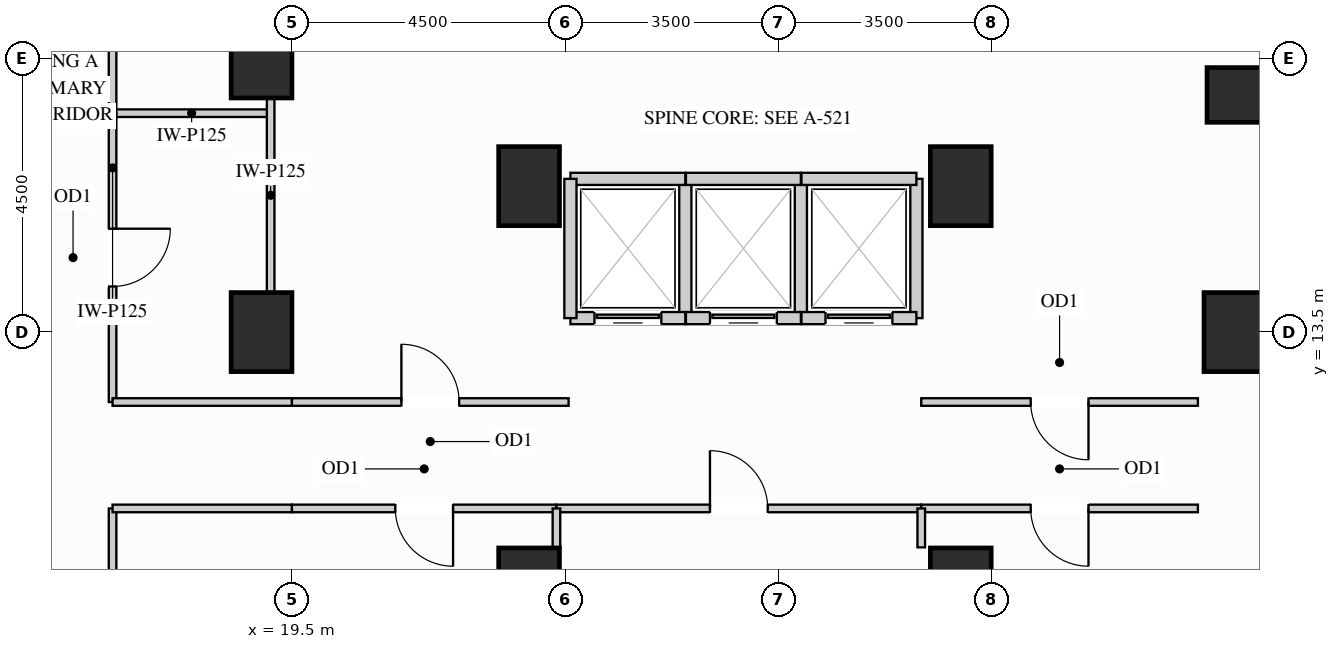
"""IFC4 building model, lengths in metres.
Left out: names, types, materials, properties, quantities, classifications, styles, units other than length and angle.
Written with IfcOpenShell. Run it as: python <this file> out.ifc"""

import sys

from ifc_helpers import new_model, si_unit, direction, frame, frame_2d, origin, origin_2d, place, context, subcontext, project, spatial, rectangle, extrude, source, transform, mapped, element, fill, save


model = new_model("IFC4")
c1 = context("Model", 3, precision=1e-05, world=origin(), true_north=direction((0.0, 1.0)))
c2 = subcontext(c1, "Body", "Model", "MODEL_VIEW")
j1 = project(units=[si_unit("LENGTHUNIT", "METRE"), si_unit("PLANEANGLEUNIT", "RADIAN")], contexts=[c1])
p1 = place(None, origin())
s1 = spatial("IfcSite", under=j1, at=p1, CompositionType="ELEMENT")
p2 = place(p1, origin())
s2 = spatial("IfcBuilding", under=s1, at=p2, CompositionType="ELEMENT")
p3 = place(p2, frame((0.0, 0.0, 58.5)))
s3 = spatial("IfcBuildingStorey", under=s2, at=p3, CompositionType="ELEMENT", Elevation=58.5)
m1 = source(origin(), c2, "Body", "SweptSolid", [
    extrude(rectangle(XDim=0.9, YDim=0.9, at=origin_2d()), origin(), (0.0, 0.0, 1.0), 3.38),
])
p4 = place(p3, frame((35.0, 17.4, 0.0), z_axis=(0.0, 0.0, 1.0), x_axis=(1.0, 0.0, 0.0)))
e1 = element("IfcColumn", 1, at=p4, inside=s3, PredefinedType="COLUMN", context=c2, shape_type="MappedRepresentation", body=[
    mapped(m1, transform((0.0, 0.0, 0.0), x_axis=(1.0, 0.0, 0.0), y_axis=(0.0, 1.0, 0.0), z_axis=(0.0, 0.0, 1.0))),
])
m2 = source(origin(), c2, "Body", "SweptSolid", [
    extrude(rectangle(XDim=1.0, YDim=1.3, at=origin_2d()), origin(), (0.0, 0.0, 1.0), 3.38),
])
for number, where, z_axis, x_axis in (
    (2, (19.0, 13.5, 0.0), (0.0, 0.0, 1.0), (1.0, 0.0, 0.0)),
    (3, (19.0, 18.0, 0.0), (0.0, 0.0, 1.0), (1.0, 0.0, 0.0)),
    (4, (35.0, 13.5, 0.0), (0.0, 0.0, 1.0), (1.0, 0.0, 0.0)),
    (5, (23.4, 15.9, 0.0), (0.0, 0.0, 1.0), (1.0, 0.0, 0.0)),
    (6, (23.4, 9.3, 0.0), (0.0, 0.0, 1.0), (1.0, 0.0, 0.0)),
    (7, (30.5, 15.9, 0.0), (0.0, 0.0, 1.0), (1.0, 0.0, 0.0)),
    (8, (30.5, 9.3, 0.0), (0.0, 0.0, 1.0), (1.0, 0.0, 0.0)),
):
    element("IfcColumn", number, at=place(p3, frame(where, z_axis=z_axis, x_axis=x_axis)), inside=s3, PredefinedType="COLUMN", context=c2, shape_type="MappedRepresentation", body=[
        mapped(m2, transform((0.0, 0.0, 0.0), x_axis=(1.0, 0.0, 0.0), y_axis=(0.0, 1.0, 0.0), z_axis=(0.0, 0.0, 1.0))),
    ])
m3 = source(origin(), c2, "Body", "SweptSolid", [
    extrude(rectangle(XDim=2.6, YDim=0.125, at=frame_2d((1.3, 0.0))), origin(), (0.0, 0.0, 1.0), 3.365),
])
p5 = place(p3, frame((16.55, 17.1, 0.0), z_axis=(0.0, 0.0, 1.0), x_axis=(1.0, 0.0, 0.0)))
e9 = element("IfcWall", 9, at=p5, inside=s3, PredefinedType="PARTITIONING", context=c2, shape_type="MappedRepresentation", body=[
    mapped(m3, transform((0.0, 0.0, 0.0), x_axis=(1.0, 0.0, 0.0), y_axis=(0.0, 1.0, 0.0), z_axis=(0.0, 0.0, 1.0))),
])
m4 = source(origin(), c2, "Body", "SweptSolid", [
    extrude(rectangle(XDim=3.18, YDim=0.125, at=frame_2d((1.59, 0.0))), origin(), (0.0, 0.0, 1.0), 2.67),
])
p6 = place(p3, frame((19.15, 14.16, 0.0), z_axis=(0.0, 0.0, 1.0), x_axis=(0.0, 1.0, 0.0)))
e10 = element("IfcWall", 10, at=p6, inside=s3, PredefinedType="PARTITIONING", context=c2, shape_type="MappedRepresentation", body=[
    mapped(m4, transform((0.0, 0.0, 0.0), x_axis=(1.0, 0.0, 0.0), y_axis=(0.0, 1.0, 0.0), z_axis=(0.0, 0.0, 1.0))),
])
p7 = place(p3, frame((16.55, 12.35, 0.0), z_axis=(0.0, 0.0, 1.0), x_axis=(0.0, 1.0, 0.0)))
e11 = element("IfcWall", 11, at=p7, inside=s3, PredefinedType="PARTITIONING", context=c2, shape_type="SweptSolid", body=[
    extrude(rectangle(XDim=4.75, YDim=0.125, at=frame_2d((2.375, 0.0))), origin(), (0.0, 0.0, 1.0), 3.365),
])
p8 = place(p7, frame((1.9, 0.0, 0.0)))
e12 = element("IfcOpeningElement", 12, at=p8, cuts=e11, PredefinedType="OPENING", context=c2, shape_type="SweptSolid", body=[
    extrude(rectangle(XDim=0.95, YDim=2.15, at=frame_2d((0.475, 1.075))), frame((0.0, 0.073, 0.0), z_axis=(0.0, -1.0, 0.0), x_axis=(1.0, 0.0, 0.0)), (0.0, 0.0, 1.0), 0.145),
])
p9 = place(p3, frame((16.55, 17.1, 0.0), z_axis=(0.0, 0.0, 1.0), x_axis=(0.0, 1.0, 0.0)))
e13 = element("IfcWall", 13, at=p9, inside=s3, PredefinedType="PARTITIONING", context=c2, shape_type="SweptSolid", body=[
    extrude(rectangle(XDim=6.25, YDim=0.125, at=frame_2d((3.125, 0.0))), origin(), (0.0, 0.0, 1.0), 3.365),
])
p10 = place(p9, frame((2.65, 0.0, 0.0)))
e14 = element("IfcOpeningElement", 14, at=p10, cuts=e13, PredefinedType="OPENING", context=c2, shape_type="SweptSolid", body=[
    extrude(rectangle(XDim=0.95, YDim=2.15, at=frame_2d((0.475, 1.075))), frame((0.0, 0.073, 0.0), z_axis=(0.0, -1.0, 0.0), x_axis=(1.0, 0.0, 0.0)), (0.0, 0.0, 1.0), 0.145),
])
p11 = place(p3, frame((16.55, 5.65, 0.0), z_axis=(0.0, 0.0, 1.0), x_axis=(0.0, 1.0, 0.0)))
e15 = element("IfcWall", 15, at=p11, inside=s3, PredefinedType="PARTITIONING", context=c2, shape_type="SweptSolid", body=[
    extrude(rectangle(XDim=4.95, YDim=0.125, at=frame_2d((2.475, 0.0))), origin(), (0.0, 0.0, 1.0), 3.365),
])
p12 = place(p11, frame((2.0, 0.0, 0.0)))
e16 = element("IfcOpeningElement", 16, at=p12, cuts=e15, PredefinedType="OPENING", context=c2, shape_type="SweptSolid", body=[
    extrude(rectangle(XDim=0.95, YDim=2.15, at=frame_2d((0.475, 1.075))), frame((0.0, 0.073, 0.0), z_axis=(0.0, -1.0, 0.0), x_axis=(1.0, 0.0, 0.0)), (0.0, 0.0, 1.0), 0.145),
])
p13 = place(p3, frame((29.85, 12.35, 0.0), z_axis=(0.0, 0.0, 1.0), x_axis=(1.0, 0.0, 0.0)))
e17 = element("IfcWall", 17, at=p13, inside=s3, PredefinedType="PARTITIONING", context=c2, shape_type="SweptSolid", body=[
    extrude(rectangle(XDim=4.55, YDim=0.125, at=frame_2d((2.275, 0.0))), origin(), (0.0, 0.0, 1.0), 3.365),
])
p14 = place(p13, frame((1.8, 0.0, 0.0)))
e18 = element("IfcOpeningElement", 18, at=p14, cuts=e17, PredefinedType="OPENING", context=c2, shape_type="SweptSolid", body=[
    extrude(rectangle(XDim=0.95, YDim=2.15, at=frame_2d((0.475, 1.075))), frame((0.0, 0.073, 0.0), z_axis=(0.0, -1.0, 0.0), x_axis=(1.0, 0.0, 0.0)), (0.0, 0.0, 1.0), 0.145),
])
m5 = source(origin(), c2, "Body", "SweptSolid", [
    extrude(rectangle(XDim=2.95, YDim=0.125, at=frame_2d((1.475, 0.0))), origin(), (0.0, 0.0, 1.0), 3.365),
])
p15 = place(p3, frame((16.55, 12.35, 0.0), z_axis=(0.0, 0.0, 1.0), x_axis=(1.0, 0.0, 0.0)))
e19 = element("IfcWall", 19, at=p15, inside=s3, PredefinedType="PARTITIONING", context=c2, shape_type="MappedRepresentation", body=[
    mapped(m5, transform((0.0, 0.0, 0.0), x_axis=(1.0, 0.0, 0.0), y_axis=(0.0, 1.0, 0.0), z_axis=(0.0, 0.0, 1.0))),
])
p16 = place(p3, frame((19.5, 12.35, 0.0), z_axis=(0.0, 0.0, 1.0), x_axis=(1.0, 0.0, 0.0)))
e20 = element("IfcWall", 20, at=p16, inside=s3, PredefinedType="PARTITIONING", context=c2, shape_type="SweptSolid", body=[
    extrude(rectangle(XDim=4.55, YDim=0.125, at=frame_2d((2.275, 0.0))), origin(), (0.0, 0.0, 1.0), 3.365),
])
p17 = place(p16, frame((1.8, 0.0, 0.0)))
e21 = element("IfcOpeningElement", 21, at=p17, cuts=e20, PredefinedType="OPENING", context=c2, shape_type="SweptSolid", body=[
    extrude(rectangle(XDim=0.95, YDim=2.15, at=frame_2d((0.475, 1.075))), frame((0.0, 0.073, 0.0), z_axis=(0.0, -1.0, 0.0), x_axis=(1.0, 0.0, 0.0)), (0.0, 0.0, 1.0), 0.145),
])
p18 = place(p3, frame((16.55, 10.6, 0.0), z_axis=(0.0, 0.0, 1.0), x_axis=(1.0, 0.0, 0.0)))
e22 = element("IfcWall", 22, at=p18, inside=s3, PredefinedType="PARTITIONING", context=c2, shape_type="MappedRepresentation", body=[
    mapped(m5, transform((0.0, 0.0, 0.0), x_axis=(1.0, 0.0, 0.0), y_axis=(0.0, 1.0, 0.0), z_axis=(0.0, 0.0, 1.0))),
])
p19 = place(p3, frame((19.5, 10.6, 0.0), z_axis=(0.0, 0.0, 1.0), x_axis=(1.0, 0.0, 0.0)))
e23 = element("IfcWall", 23, at=p19, inside=s3, PredefinedType="PARTITIONING", context=c2, shape_type="SweptSolid", body=[
    extrude(rectangle(XDim=4.35, YDim=0.125, at=frame_2d((2.175, 0.0))), origin(), (0.0, 0.0, 1.0), 3.365),
])
p20 = place(p19, frame((1.7, 0.0, 0.0)))
e24 = element("IfcOpeningElement", 24, at=p20, cuts=e23, PredefinedType="OPENING", context=c2, shape_type="SweptSolid", body=[
    extrude(rectangle(XDim=0.95, YDim=2.15, at=frame_2d((0.475, 1.075))), frame((0.0, 0.073, 0.0), z_axis=(0.0, -1.0, 0.0), x_axis=(1.0, 0.0, 0.0)), (0.0, 0.0, 1.0), 0.145),
])
p21 = place(p3, frame((23.85, 10.6, 0.0), z_axis=(0.0, 0.0, 1.0), x_axis=(1.0, 0.0, 0.0)))
e25 = element("IfcWall", 25, at=p21, inside=s3, PredefinedType="PARTITIONING", context=c2, shape_type="SweptSolid", body=[
    extrude(rectangle(XDim=6.0, YDim=0.125, at=frame_2d((3.0, 0.0))), origin(), (0.0, 0.0, 1.0), 3.365),
])
p22 = place(p21, frame((2.525, 0.0, 0.0)))
e26 = element("IfcOpeningElement", 26, at=p22, cuts=e25, PredefinedType="OPENING", context=c2, shape_type="SweptSolid", body=[
    extrude(rectangle(XDim=0.95, YDim=2.15, at=frame_2d((0.475, 1.075))), frame((0.0, 0.073, 0.0), z_axis=(0.0, -1.0, 0.0), x_axis=(1.0, 0.0, 0.0)), (0.0, 0.0, 1.0), 0.145),
])
p23 = place(p3, frame((29.85, 10.6, 0.0), z_axis=(0.0, 0.0, 1.0), x_axis=(1.0, 0.0, 0.0)))
e27 = element("IfcWall", 27, at=p23, inside=s3, PredefinedType="PARTITIONING", context=c2, shape_type="SweptSolid", body=[
    extrude(rectangle(XDim=4.55, YDim=0.125, at=frame_2d((2.275, 0.0))), origin(), (0.0, 0.0, 1.0), 3.365),
])
p24 = place(p23, frame((1.8, 0.0, 0.0)))
e28 = element("IfcOpeningElement", 28, at=p24, cuts=e27, PredefinedType="OPENING", context=c2, shape_type="SweptSolid", body=[
    extrude(rectangle(XDim=0.95, YDim=2.15, at=frame_2d((0.475, 1.075))), frame((0.0, 0.073, 0.0), z_axis=(0.0, -1.0, 0.0), x_axis=(1.0, 0.0, 0.0)), (0.0, 0.0, 1.0), 0.145),
])
m6 = source(origin(), c2, "Body", "SweptSolid", [
    extrude(rectangle(XDim=0.64, YDim=0.125, at=frame_2d((0.32, 0.0))), origin(), (0.0, 0.0, 1.0), 3.365),
])
for number, where, z_axis, x_axis in (
    (29, (23.85, 9.96, 0.0), (0.0, 0.0, 1.0), (0.0, 1.0, 0.0)),
    (30, (29.85, 9.96, 0.0), (0.0, 0.0, 1.0), (0.0, 1.0, 0.0)),
):
    element("IfcWall", number, at=place(p3, frame(where, z_axis=z_axis, x_axis=x_axis)), inside=s3, PredefinedType="PARTITIONING", context=c2, shape_type="MappedRepresentation", body=[
        mapped(m6, transform((0.0, 0.0, 0.0), x_axis=(1.0, 0.0, 0.0), y_axis=(0.0, 1.0, 0.0), z_axis=(0.0, 0.0, 1.0))),
    ])
m7 = source(origin(), c2, "Body", "SweptSolid", [
    extrude(rectangle(XDim=2.29, YDim=0.2, at=frame_2d((1.145, 0.0))), origin(), (0.0, 0.0, 1.0), 3.365),
])
p25 = place(p3, frame((25.97, 13.73, 0.0), z_axis=(0.0, 0.0, 1.0), x_axis=(0.0, 1.0, 0.0)))
e31 = element("IfcWall", 31, at=p25, inside=s3, PredefinedType="PARTITIONING", context=c2, shape_type="MappedRepresentation", body=[
    mapped(m7, transform((0.0, 0.0, 0.0), x_axis=(1.0, 0.0, 0.0), y_axis=(0.0, 1.0, 0.0), z_axis=(0.0, 0.0, 1.0))),
])
m8 = source(origin(), c2, "Body", "SweptSolid", [
    extrude(rectangle(XDim=1.89, YDim=0.2, at=frame_2d((0.945, 0.0))), origin(), (0.0, 0.0, 1.0), 2.67),
])
p26 = place(p3, frame((24.08, 16.02, 0.0), z_axis=(0.0, 0.0, 1.0), x_axis=(1.0, 0.0, 0.0)))
e32 = element("IfcWall", 32, at=p26, inside=s3, PredefinedType="PARTITIONING", context=c2, shape_type="MappedRepresentation", body=[
    mapped(m8, transform((0.0, 0.0, 0.0), x_axis=(1.0, 0.0, 0.0), y_axis=(0.0, 1.0, 0.0), z_axis=(0.0, 0.0, 1.0))),
])
p27 = place(p3, frame((24.08, 13.73, 0.0), z_axis=(0.0, 0.0, 1.0), x_axis=(1.0, 0.0, 0.0)))
e33 = element("IfcWall", 33, at=p27, inside=s3, PredefinedType="PARTITIONING", context=c2, shape_type="SweptSolid", body=[
    extrude(rectangle(XDim=1.89, YDim=0.2, at=frame_2d((0.945, 0.0))), origin(), (0.0, 0.0, 1.0), 2.446),
])
p28 = place(p27, frame((0.395, 0.0, 0.0)))
e34 = element("IfcOpeningElement", 34, at=p28, cuts=e33, PredefinedType="OPENING", context=c2, shape_type="SweptSolid", body=[
    extrude(rectangle(XDim=1.1, YDim=2.2, at=frame_2d((0.55, 1.1))), frame((0.0, 0.11, 0.0), z_axis=(0.0, -1.0, 0.0), x_axis=(1.0, 0.0, 0.0)), (0.0, 0.0, 1.0), 0.22),
])
for number, where, z_axis, x_axis in (
    (35, (24.08, 13.73, 0.0), (0.0, 0.0, 1.0), (0.0, 1.0, 0.0)),
    (36, (27.87, 13.73, 0.0), (0.0, 0.0, 1.0), (0.0, 1.0, 0.0)),
):
    element("IfcWall", number, at=place(p3, frame(where, z_axis=z_axis, x_axis=x_axis)), inside=s3, PredefinedType="PARTITIONING", context=c2, shape_type="MappedRepresentation", body=[
        mapped(m7, transform((0.0, 0.0, 0.0), x_axis=(1.0, 0.0, 0.0), y_axis=(0.0, 1.0, 0.0), z_axis=(0.0, 0.0, 1.0))),
    ])
m9 = source(origin(), c2, "Body", "SweptSolid", [
    extrude(rectangle(XDim=1.89, YDim=0.2, at=frame_2d((0.945, 0.0))), origin(), (0.0, 0.0, 1.0), 2.67),
])
p29 = place(p3, frame((25.98, 16.02, 0.0), z_axis=(0.0, 0.0, 1.0), x_axis=(1.0, 0.0, 0.0)))
e37 = element("IfcWall", 37, at=p29, inside=s3, PredefinedType="PARTITIONING", context=c2, shape_type="MappedRepresentation", body=[
    mapped(m9, transform((0.0, 0.0, 0.0), x_axis=(1.0, 0.0, 0.0), y_axis=(0.0, 1.0, 0.0), z_axis=(0.0, 0.0, 1.0))),
])
p30 = place(p3, frame((25.98, 13.73, 0.0), z_axis=(0.0, 0.0, 1.0), x_axis=(1.0, 0.0, 0.0)))
e38 = element("IfcWall", 38, at=p30, inside=s3, PredefinedType="PARTITIONING", context=c2, shape_type="SweptSolid", body=[
    extrude(rectangle(XDim=1.89, YDim=0.2, at=frame_2d((0.945, 0.0))), origin(), (0.0, 0.0, 1.0), 2.446),
])
p31 = place(p30, frame((0.395, 0.0, 0.0)))
e39 = element("IfcOpeningElement", 39, at=p31, cuts=e38, PredefinedType="OPENING", context=c2, shape_type="SweptSolid", body=[
    extrude(rectangle(XDim=1.1, YDim=2.2, at=frame_2d((0.55, 1.1))), frame((0.0, 0.11, 0.0), z_axis=(0.0, -1.0, 0.0), x_axis=(1.0, 0.0, 0.0)), (0.0, 0.0, 1.0), 0.22),
])
p32 = place(p3, frame((29.77, 13.73, 0.0), z_axis=(0.0, 0.0, 1.0), x_axis=(0.0, 1.0, 0.0)))
e40 = element("IfcWall", 40, at=p32, inside=s3, PredefinedType="PARTITIONING", context=c2, shape_type="MappedRepresentation", body=[
    mapped(m7, transform((0.0, 0.0, 0.0), x_axis=(1.0, 0.0, 0.0), y_axis=(0.0, 1.0, 0.0), z_axis=(0.0, 0.0, 1.0))),
])
p33 = place(p3, frame((27.88, 16.02, 0.0), z_axis=(0.0, 0.0, 1.0), x_axis=(1.0, 0.0, 0.0)))
e41 = element("IfcWall", 41, at=p33, inside=s3, PredefinedType="PARTITIONING", context=c2, shape_type="MappedRepresentation", body=[
    mapped(m9, transform((0.0, 0.0, 0.0), x_axis=(1.0, 0.0, 0.0), y_axis=(0.0, 1.0, 0.0), z_axis=(0.0, 0.0, 1.0))),
])
p34 = place(p3, frame((27.88, 13.73, 0.0), z_axis=(0.0, 0.0, 1.0), x_axis=(1.0, 0.0, 0.0)))
e42 = element("IfcWall", 42, at=p34, inside=s3, PredefinedType="PARTITIONING", context=c2, shape_type="SweptSolid", body=[
    extrude(rectangle(XDim=1.89, YDim=0.2, at=frame_2d((0.945, 0.0))), origin(), (0.0, 0.0, 1.0), 2.446),
])
p35 = place(p34, frame((0.395, 0.0, 0.0)))
e43 = element("IfcOpeningElement", 43, at=p35, cuts=e42, PredefinedType="OPENING", context=c2, shape_type="SweptSolid", body=[
    extrude(rectangle(XDim=1.1, YDim=2.2, at=frame_2d((0.55, 1.1))), frame((0.0, 0.11, 0.0), z_axis=(0.0, -1.0, 0.0), x_axis=(1.0, 0.0, 0.0)), (0.0, 0.0, 1.0), 0.22),
])
m10 = source(origin(), c2, "Body", "SweptSolid", [
    extrude(rectangle(XDim=1.1, YDim=2.2, at=frame_2d((0.55, 1.1))), frame((0.0, 0.025, 0.0), z_axis=(0.0, -1.0, 0.0), x_axis=(1.0, 0.0, 0.0)), (0.0, 0.0, 1.0), 0.05),
])
p36 = place(p28, origin())
e44 = element("IfcDoor", 44, at=p36, inside=s3, OperationType="SLIDING_TO_LEFT", PredefinedType="DOOR", context=c2, shape_type="MappedRepresentation", body=[
    mapped(m10, transform((0.0, 0.0, 0.0), x_axis=(1.0, 0.0, 0.0), y_axis=(0.0, 1.0, 0.0), z_axis=(0.0, 0.0, 1.0))),
])
fill(e34, e44)
p37 = place(p31, origin())
e45 = element("IfcDoor", 45, at=p37, inside=s3, OperationType="SLIDING_TO_LEFT", PredefinedType="DOOR", context=c2, shape_type="MappedRepresentation", body=[
    mapped(m10, transform((0.0, 0.0, 0.0), x_axis=(1.0, 0.0, 0.0), y_axis=(0.0, 1.0, 0.0), z_axis=(0.0, 0.0, 1.0))),
])
fill(e39, e45)
p38 = place(p35, origin())
e46 = element("IfcDoor", 46, at=p38, inside=s3, OperationType="SLIDING_TO_LEFT", PredefinedType="DOOR", context=c2, shape_type="MappedRepresentation", body=[
    mapped(m10, transform((0.0, 0.0, 0.0), x_axis=(1.0, 0.0, 0.0), y_axis=(0.0, 1.0, 0.0), z_axis=(0.0, 0.0, 1.0))),
])
fill(e43, e46)
m11 = source(origin(), c2, "Body", "SweptSolid", [
    extrude(rectangle(XDim=0.95, YDim=2.15, at=frame_2d((0.475, 1.075))), frame((0.0, 0.025, 0.0), z_axis=(0.0, -1.0, 0.0), x_axis=(1.0, 0.0, 0.0)), (0.0, 0.0, 1.0), 0.05),
])
p39 = place(p8, origin())
e47 = element("IfcDoor", 47, at=p39, inside=s3, OperationType="SINGLE_SWING_RIGHT", PredefinedType="DOOR", context=c2, shape_type="MappedRepresentation", body=[
    mapped(m11, transform((0.0, 0.0, 0.0), x_axis=(1.0, 0.0, 0.0), y_axis=(0.0, 1.0, 0.0), z_axis=(0.0, 0.0, 1.0))),
])
fill(e12, e47)
p40 = place(p17, origin())
e48 = element("IfcDoor", 48, at=p40, inside=s3, OperationType="SINGLE_SWING_LEFT", PredefinedType="DOOR", context=c2, shape_type="MappedRepresentation", body=[
    mapped(m11, transform((0.0, 0.0, 0.0), x_axis=(1.0, 0.0, 0.0), y_axis=(0.0, 1.0, 0.0), z_axis=(0.0, 0.0, 1.0))),
])
fill(e21, e48)
p41 = place(p14, origin())
e49 = element("IfcDoor", 49, at=p41, inside=s3, OperationType="SINGLE_SWING_RIGHT", PredefinedType="DOOR", context=c2, shape_type="MappedRepresentation", body=[
    mapped(m11, transform((0.0, 0.0, 0.0), x_axis=(1.0, 0.0, 0.0), y_axis=(0.0, 1.0, 0.0), z_axis=(0.0, 0.0, 1.0))),
])
fill(e18, e49)
p42 = place(p20, origin())
e50 = element("IfcDoor", 50, at=p42, inside=s3, OperationType="SINGLE_SWING_RIGHT", PredefinedType="DOOR", context=c2, shape_type="MappedRepresentation", body=[
    mapped(m11, transform((0.0, 0.0, 0.0), x_axis=(1.0, 0.0, 0.0), y_axis=(0.0, 1.0, 0.0), z_axis=(0.0, 0.0, 1.0))),
])
fill(e24, e50)
p43 = place(p22, origin())
e51 = element("IfcDoor", 51, at=p43, inside=s3, OperationType="SINGLE_SWING_LEFT", PredefinedType="DOOR", context=c2, shape_type="MappedRepresentation", body=[
    mapped(m11, transform((0.0, 0.0, 0.0), x_axis=(1.0, 0.0, 0.0), y_axis=(0.0, 1.0, 0.0), z_axis=(0.0, 0.0, 1.0))),
])
fill(e26, e51)
p44 = place(p24, origin())
e52 = element("IfcDoor", 52, at=p44, inside=s3, OperationType="SINGLE_SWING_RIGHT", PredefinedType="DOOR", context=c2, shape_type="MappedRepresentation", body=[
    mapped(m11, transform((0.0, 0.0, 0.0), x_axis=(1.0, 0.0, 0.0), y_axis=(0.0, 1.0, 0.0), z_axis=(0.0, 0.0, 1.0))),
])
fill(e28, e52)
save(model, sys.argv[1])
